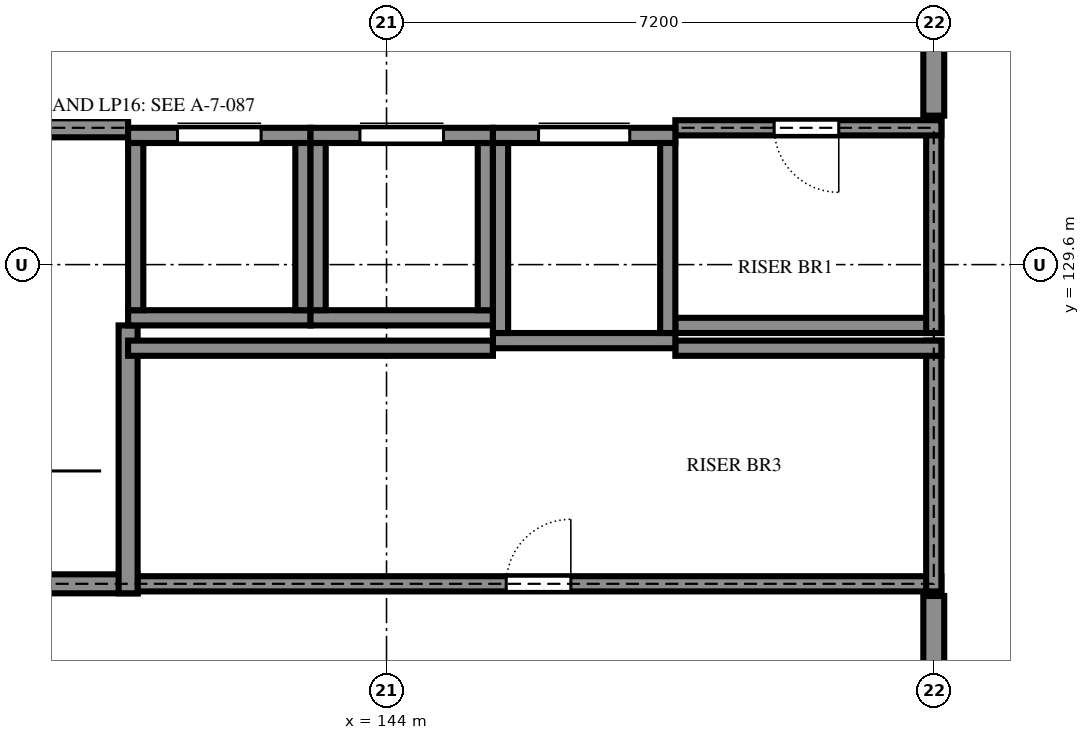
"""IFC4 building model, lengths in metres.
Left out: names, types, materials, properties, quantities, classifications, styles, units other than length and angle.
Written with IfcOpenShell. Run it as: python <this file> out.ifc"""

import sys

from ifc_helpers import new_model, si_unit, direction, frame, frame_2d, origin, place, context, subcontext, project, spatial, rectangle, extrude, element, fill, save


model = new_model("IFC4")
c1 = context("Model", 3, precision=1e-05, world=origin(), true_north=direction((0.0, 1.0)))
c2 = subcontext(c1, "Body", "Model", "MODEL_VIEW")
j1 = project(units=[si_unit("LENGTHUNIT", "METRE"), si_unit("PLANEANGLEUNIT", "RADIAN")], contexts=[c1])
p1 = place(None, origin())
s1 = spatial("IfcSite", under=j1, at=p1, CompositionType="ELEMENT")
p2 = place(p1, origin())
s2 = spatial("IfcBuilding", under=s1, at=p2, CompositionType="ELEMENT")
p3 = place(p2, frame((0.0, 0.0, 14.4)))
s3 = spatial("IfcBuildingStorey", under=s2, at=p3, CompositionType="ELEMENT", Elevation=14.4)
p4 = place(p3, frame((136.675, 125.4, 0.0), z_axis=(0.0, 0.0, 1.0), x_axis=(1.0, 0.0, 0.0)))
e1 = element("IfcWall", 1, at=p4, inside=s3, PredefinedType="SHEAR", context=c2, shape_type="SweptSolid", body=[
    extrude(rectangle(XDim=4.05, YDim=0.25, at=frame_2d((2.025, 0.0))), origin(), (0.0, 0.0, 1.0), 3.6),
])
p5 = place(p4, frame((1.375, 0.0, 0.0)))
e2 = element("IfcOpeningElement", 2, at=p5, cuts=e1, PredefinedType="OPENING", context=c2, shape_type="SweptSolid", body=[
    extrude(rectangle(XDim=1.2, YDim=2.4, at=frame_2d((0.6, 1.2))), frame((0.0, 0.135, 0.0), z_axis=(0.0, -1.0, 0.0), x_axis=(1.0, 0.0, 0.0)), (0.0, 0.0, 1.0), 0.27),
])
p6 = place(p3, frame((140.725, 125.4, 0.0), z_axis=(0.0, 0.0, 1.0), x_axis=(1.0, 0.0, 0.0)))
e3 = element("IfcWall", 3, at=p6, inside=s3, PredefinedType="SHEAR", context=c2, shape_type="SweptSolid", body=[
    extrude(rectangle(XDim=10.575, YDim=0.2, at=frame_2d((5.288, 0.0))), origin(), (0.0, 0.0, 1.0), 3.6),
])
p7 = place(p6, frame((4.85, 0.0, 0.0)))
e4 = element("IfcOpeningElement", 4, at=p7, cuts=e3, PredefinedType="OPENING", context=c2, shape_type="SweptSolid", body=[
    extrude(rectangle(XDim=0.85, YDim=2.1, at=frame_2d((0.425, 1.05))), frame((0.0, 0.11, 0.0), z_axis=(0.0, -1.0, 0.0), x_axis=(1.0, 0.0, 0.0)), (0.0, 0.0, 1.0), 0.22),
])
p8 = place(p3, frame((140.6, 125.275, 0.0), z_axis=(0.0, 0.0, 1.0), x_axis=(0.0, 1.0, 0.0)))
e5 = element("IfcWall", 5, at=p8, inside=s3, PredefinedType="SHEAR", context=c2, shape_type="SweptSolid", body=[
    extrude(rectangle(XDim=3.525, YDim=0.25, at=frame_2d((1.763, 0.0))), origin(), (0.0, 0.0, 1.0), 3.6),
])
p9 = place(p3, frame((151.2, 125.3, 0.0), z_axis=(0.0, 0.0, 1.0), x_axis=(0.0, 1.0, 0.0)))
e6 = element("IfcWall", 6, at=p9, inside=s3, PredefinedType="SHEAR", context=c2, shape_type="SweptSolid", body=[
    extrude(rectangle(XDim=3.3, YDim=0.2, at=frame_2d((1.65, 0.0))), origin(), (0.0, 0.0, 1.0), 3.6),
])
p10 = place(p3, frame((140.6, 128.5, 0.0), z_axis=(0.0, 0.0, 1.0), x_axis=(1.0, 0.0, 0.0)))
e7 = element("IfcWall", 7, at=p10, inside=s3, PredefinedType="SHEAR", context=c2, shape_type="SweptSolid", body=[
    extrude(rectangle(XDim=4.8, YDim=0.2, at=frame_2d((2.4, 0.0))), origin(), (0.0, 0.0, 1.0), 3.6),
])
for number, where, z_axis, x_axis in (
    (8, (147.8, 128.5, 0.0), (0.0, 0.0, 1.0), (1.0, 0.0, 0.0)),
    (9, (147.8, 128.8, 0.0), (0.0, 0.0, 1.0), (1.0, 0.0, 0.0)),
):
    element("IfcWall", number, at=place(p3, frame(where, z_axis=z_axis, x_axis=x_axis)), inside=s3, PredefinedType="SHEAR", context=c2, shape_type="SweptSolid", body=[
        extrude(rectangle(XDim=3.5, YDim=0.2, at=frame_2d((1.75, 0.0))), origin(), (0.0, 0.0, 1.0), 3.6),
    ])
p11 = place(p3, frame((151.2, 128.7, 0.0), z_axis=(0.0, 0.0, 1.0), x_axis=(0.0, 1.0, 0.0)))
e10 = element("IfcWall", 10, at=p11, inside=s3, PredefinedType="SHEAR", context=c2, shape_type="SweptSolid", body=[
    extrude(rectangle(XDim=2.8, YDim=0.2, at=frame_2d((1.4, 0.0))), origin(), (0.0, 0.0, 1.0), 3.6),
])
p12 = place(p3, frame((140.6, 131.4, 0.0), z_axis=(0.0, 0.0, 1.0), x_axis=(-1.0, 0.0, 0.0)))
e11 = element("IfcWall", 11, at=p12, inside=s3, PredefinedType="SHEAR", context=c2, shape_type="SweptSolid", body=[
    extrude(rectangle(XDim=3.925, YDim=0.25, at=frame_2d((1.962, 0.0))), origin(), (0.0, 0.0, 1.0), 3.6),
])
p13 = place(p3, frame((151.3, 131.4, 0.0), z_axis=(0.0, 0.0, 1.0), x_axis=(-1.0, 0.0, 0.0)))
e12 = element("IfcWall", 12, at=p13, inside=s3, PredefinedType="SHEAR", context=c2, shape_type="SweptSolid", body=[
    extrude(rectangle(XDim=3.5, YDim=0.2, at=frame_2d((1.75, 0.0))), origin(), (0.0, 0.0, 1.0), 3.6),
])
p14 = place(p13, frame((1.35, 0.0, 0.0)))
e13 = element("IfcOpeningElement", 13, at=p14, cuts=e12, PredefinedType="OPENING", context=c2, shape_type="SweptSolid", body=[
    extrude(rectangle(XDim=0.85, YDim=2.1, at=frame_2d((0.425, 1.05))), frame((0.0, 0.11, 0.0), z_axis=(0.0, -1.0, 0.0), x_axis=(1.0, 0.0, 0.0)), (0.0, 0.0, 1.0), 0.22),
])
p15 = place(p3, frame((140.6, 128.9, 0.0), z_axis=(0.0, 0.0, 1.0), x_axis=(1.0, 0.0, 0.0)))
e14 = element("IfcWall", 14, at=p15, inside=s3, PredefinedType="SHEAR", context=c2, shape_type="SweptSolid", body=[
    extrude(rectangle(XDim=2.4, YDim=0.2, at=frame_2d((1.2, 0.0))), origin(), (0.0, 0.0, 1.0), 4.5),
])
p16 = place(p3, frame((140.6, 131.3, 0.0), z_axis=(0.0, 0.0, 1.0), x_axis=(1.0, 0.0, 0.0)))
e15 = element("IfcWall", 15, at=p16, inside=s3, PredefinedType="SHEAR", context=c2, shape_type="SweptSolid", body=[
    extrude(rectangle(XDim=2.4, YDim=0.2, at=frame_2d((1.2, 0.0))), origin(), (0.0, 0.0, 1.0), 4.5),
])
p17 = place(p16, frame((0.65, 0.0, 0.0)))
e16 = element("IfcOpeningElement", 16, at=p17, cuts=e15, PredefinedType="OPENING", context=c2, shape_type="SweptSolid", body=[
    extrude(rectangle(XDim=1.1, YDim=2.1, at=frame_2d((0.55, 1.05))), frame((0.0, 0.11, 0.0), z_axis=(0.0, -1.0, 0.0), x_axis=(1.0, 0.0, 0.0)), (0.0, 0.0, 1.0), 0.22),
])
for number, where, z_axis, x_axis in (
    (17, (140.7, 129.0, 0.0), (0.0, 0.0, 1.0), (0.0, 1.0, 0.0)),
    (18, (142.9, 129.0, 0.0), (0.0, 0.0, 1.0), (0.0, 1.0, 0.0)),
):
    element("IfcWall", number, at=place(p3, frame(where, z_axis=z_axis, x_axis=x_axis)), inside=s3, PredefinedType="SHEAR", context=c2, shape_type="SweptSolid", body=[
        extrude(rectangle(XDim=2.2, YDim=0.2, at=frame_2d((1.1, 0.0))), origin(), (0.0, 0.0, 1.0), 4.5),
    ])
p18 = place(p3, frame((143.0, 128.9, 0.0), z_axis=(0.0, 0.0, 1.0), x_axis=(1.0, 0.0, 0.0)))
e19 = element("IfcWall", 19, at=p18, inside=s3, PredefinedType="SHEAR", context=c2, shape_type="SweptSolid", body=[
    extrude(rectangle(XDim=2.4, YDim=0.2, at=frame_2d((1.2, 0.0))), origin(), (0.0, 0.0, 1.0), 4.5),
])
p19 = place(p3, frame((143.0, 131.3, 0.0), z_axis=(0.0, 0.0, 1.0), x_axis=(1.0, 0.0, 0.0)))
e20 = element("IfcWall", 20, at=p19, inside=s3, PredefinedType="SHEAR", context=c2, shape_type="SweptSolid", body=[
    extrude(rectangle(XDim=2.4, YDim=0.2, at=frame_2d((1.2, 0.0))), origin(), (0.0, 0.0, 1.0), 4.5),
])
p20 = place(p19, frame((0.65, 0.0, 0.0)))
e21 = element("IfcOpeningElement", 21, at=p20, cuts=e20, PredefinedType="OPENING", context=c2, shape_type="SweptSolid", body=[
    extrude(rectangle(XDim=1.1, YDim=2.1, at=frame_2d((0.55, 1.05))), frame((0.0, 0.11, 0.0), z_axis=(0.0, -1.0, 0.0), x_axis=(1.0, 0.0, 0.0)), (0.0, 0.0, 1.0), 0.22),
])
for number, where, z_axis, x_axis in (
    (22, (143.1, 129.0, 0.0), (0.0, 0.0, 1.0), (0.0, 1.0, 0.0)),
    (23, (145.3, 129.0, 0.0), (0.0, 0.0, 1.0), (0.0, 1.0, 0.0)),
):
    element("IfcWall", number, at=place(p3, frame(where, z_axis=z_axis, x_axis=x_axis)), inside=s3, PredefinedType="SHEAR", context=c2, shape_type="SweptSolid", body=[
        extrude(rectangle(XDim=2.2, YDim=0.2, at=frame_2d((1.1, 0.0))), origin(), (0.0, 0.0, 1.0), 4.5),
    ])
p21 = place(p3, frame((145.4, 128.6, 0.0), z_axis=(0.0, 0.0, 1.0), x_axis=(1.0, 0.0, 0.0)))
e24 = element("IfcWall", 24, at=p21, inside=s3, PredefinedType="SHEAR", context=c2, shape_type="SweptSolid", body=[
    extrude(rectangle(XDim=2.4, YDim=0.2, at=frame_2d((1.2, 0.0))), origin(), (0.0, 0.0, 1.0), 4.5),
])
p22 = place(p3, frame((145.4, 131.3, 0.0), z_axis=(0.0, 0.0, 1.0), x_axis=(1.0, 0.0, 0.0)))
e25 = element("IfcWall", 25, at=p22, inside=s3, PredefinedType="SHEAR", context=c2, shape_type="SweptSolid", body=[
    extrude(rectangle(XDim=2.4, YDim=0.2, at=frame_2d((1.2, 0.0))), origin(), (0.0, 0.0, 1.0), 4.5),
])
p23 = place(p22, frame((0.6, 0.0, 0.0)))
e26 = element("IfcOpeningElement", 26, at=p23, cuts=e25, PredefinedType="OPENING", context=c2, shape_type="SweptSolid", body=[
    extrude(rectangle(XDim=1.2, YDim=2.1, at=frame_2d((0.6, 1.05))), frame((0.0, 0.11, 0.0), z_axis=(0.0, -1.0, 0.0), x_axis=(1.0, 0.0, 0.0)), (0.0, 0.0, 1.0), 0.22),
])
for number, where, z_axis, x_axis in (
    (27, (145.5, 128.7, 0.0), (0.0, 0.0, 1.0), (0.0, 1.0, 0.0)),
    (28, (147.7, 128.7, 0.0), (0.0, 0.0, 1.0), (0.0, 1.0, 0.0)),
):
    element("IfcWall", number, at=place(p3, frame(where, z_axis=z_axis, x_axis=x_axis)), inside=s3, PredefinedType="SHEAR", context=c2, shape_type="SweptSolid", body=[
        extrude(rectangle(XDim=2.5, YDim=0.2, at=frame_2d((1.25, 0.0))), origin(), (0.0, 0.0, 1.0), 4.5),
    ])
p24 = place(p3, frame((151.2, 122.64, 0.0), z_axis=(0.0, 0.0, 1.0), x_axis=(0.0, 1.0, 0.0)))
e29 = element("IfcWall", 29, at=p24, inside=s3, PredefinedType="PARTITIONING", context=c2, shape_type="SweptSolid", body=[
    extrude(rectangle(XDim=2.6, YDim=0.275, at=frame_2d((1.3, 0.0))), origin(), (0.0, 0.0, 1.0), 3.6),
])
p25 = place(p3, frame((151.2, 134.333, 0.0), z_axis=(0.0, 0.0, 1.0), x_axis=(0.0, -1.0, 0.0)))
e30 = element("IfcWall", 30, at=p25, inside=s3, PredefinedType="PARTITIONING", context=c2, shape_type="SweptSolid", body=[
    extrude(rectangle(XDim=2.772, YDim=0.275, at=frame_2d((1.386, 0.0))), origin(), (0.0, 0.0, 1.0), 3.6),
])
p26 = place(p17, origin())
e31 = element("IfcDoor", 31, at=p26, inside=s3, OperationType="SLIDING_TO_LEFT", PredefinedType="DOOR", context=c2, shape_type="SweptSolid", body=[
    extrude(rectangle(XDim=1.1, YDim=2.1, at=frame_2d((0.55, 1.05))), frame((0.0, 0.025, 0.0), z_axis=(0.0, -1.0, 0.0), x_axis=(1.0, 0.0, 0.0)), (0.0, 0.0, 1.0), 0.05),
])
fill(e16, e31)
p27 = place(p20, origin())
e32 = element("IfcDoor", 32, at=p27, inside=s3, OperationType="SLIDING_TO_LEFT", PredefinedType="DOOR", context=c2, shape_type="SweptSolid", body=[
    extrude(rectangle(XDim=1.1, YDim=2.1, at=frame_2d((0.55, 1.05))), frame((0.0, 0.025, 0.0), z_axis=(0.0, -1.0, 0.0), x_axis=(1.0, 0.0, 0.0)), (0.0, 0.0, 1.0), 0.05),
])
fill(e21, e32)
p28 = place(p23, origin())
e33 = element("IfcDoor", 33, at=p28, inside=s3, OperationType="SLIDING_TO_LEFT", PredefinedType="DOOR", context=c2, shape_type="SweptSolid", body=[
    extrude(rectangle(XDim=1.2, YDim=2.1, at=frame_2d((0.6, 1.05))), frame((0.0, 0.025, 0.0), z_axis=(0.0, -1.0, 0.0), x_axis=(1.0, 0.0, 0.0)), (0.0, 0.0, 1.0), 0.05),
])
fill(e26, e33)
p29 = place(p14, origin())
e34 = element("IfcDoor", 34, at=p29, inside=s3, OperationType="SINGLE_SWING_RIGHT", PredefinedType="DOOR", context=c2, shape_type="SweptSolid", body=[
    extrude(rectangle(XDim=0.85, YDim=2.1, at=frame_2d((0.425, 1.05))), frame((0.0, 0.025, 0.0), z_axis=(0.0, -1.0, 0.0), x_axis=(1.0, 0.0, 0.0)), (0.0, 0.0, 1.0), 0.05),
])
fill(e13, e34)
p30 = place(p7, origin())
e35 = element("IfcDoor", 35, at=p30, inside=s3, OperationType="SINGLE_SWING_LEFT", PredefinedType="DOOR", context=c2, shape_type="SweptSolid", body=[
    extrude(rectangle(XDim=0.85, YDim=2.1, at=frame_2d((0.425, 1.05))), frame((0.0, 0.025, 0.0), z_axis=(0.0, -1.0, 0.0), x_axis=(1.0, 0.0, 0.0)), (0.0, 0.0, 1.0), 0.05),
])
fill(e4, e35)
save(model, sys.argv[1])
